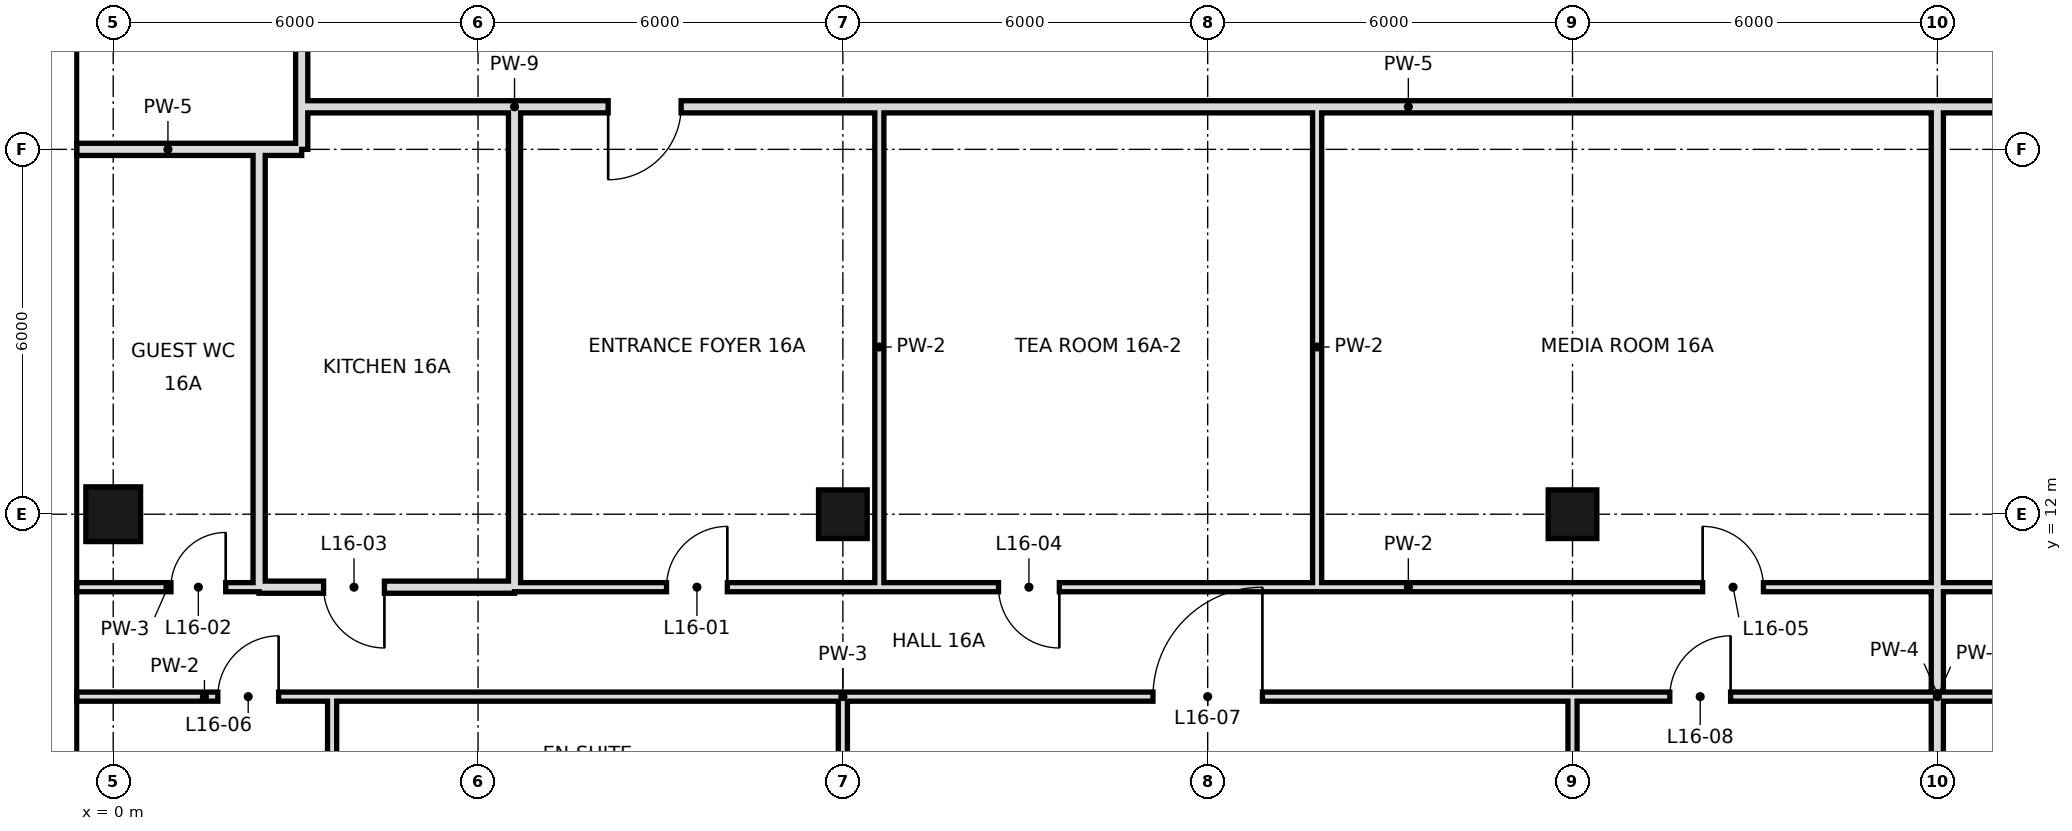
"""IFC4 building model, lengths in metres.
Left out: names, types, materials, properties, quantities, classifications, styles, units other than length and angle.
Written with IfcOpenShell. Run it as: python <this file> out.ifc"""

import sys

from ifc_helpers import new_model, si_unit, direction, frame, frame_2d, origin, origin_2d, place, context, subcontext, project, spatial, rectangle, hollow_rectangle, extrude, element, fill, save


model = new_model("IFC4")
c1 = context("Model", 3, precision=1e-05, world=origin(), true_north=direction((0.0, 1.0)))
c2 = subcontext(c1, "Body", "Model", "MODEL_VIEW")
j1 = project(units=[si_unit("LENGTHUNIT", "METRE"), si_unit("PLANEANGLEUNIT", "RADIAN")], contexts=[c1])
p1 = place(None, origin())
s1 = spatial("IfcSite", under=j1, at=p1, CompositionType="ELEMENT")
p2 = place(p1, origin())
s2 = spatial("IfcBuilding", under=s1, at=p2, CompositionType="ELEMENT")
p3 = place(p2, frame((0.0, 0.0, 78.6)))
s3 = spatial("IfcBuildingStorey", under=s2, at=p3, CompositionType="ELEMENT", Elevation=78.6)
p4 = place(p3, frame((0.0, 12.0, 0.0), z_axis=(0.0, 0.0, 1.0), x_axis=(1.0, 0.0, 0.0)))
e1 = element("IfcColumn", 1, at=p4, inside=s3, PredefinedType="COLUMN", context=c2, shape_type="SweptSolid", body=[
    extrude(hollow_rectangle(XDim=0.9, YDim=0.9, WallThickness=0.045, at=origin_2d()), origin(), (0.0, 0.0, 1.0), 3.6),
])
for number, where, z_axis, x_axis in (
    (2, (12.0, 12.0, 0.0), (0.0, 0.0, 1.0), (1.0, 0.0, 0.0)),
    (3, (24.0, 12.0, 0.0), (0.0, 0.0, 1.0), (1.0, 0.0, 0.0)),
):
    element("IfcColumn", number, at=place(p3, frame(where, z_axis=z_axis, x_axis=x_axis)), inside=s3, PredefinedType="COLUMN", context=c2, shape_type="SweptSolid", body=[
        extrude(hollow_rectangle(XDim=0.8, YDim=0.8, WallThickness=0.04, at=origin_2d()), origin(), (0.0, 0.0, 1.0), 3.6),
    ])
p5 = place(p3, frame((12.0, 6.0, 0.0), z_axis=(0.0, 0.0, 1.0), x_axis=(0.0, 1.0, 0.0)))
e4 = element("IfcWall", 4, at=p5, inside=s3, PredefinedType="PARTITIONING", context=c2, shape_type="SweptSolid", body=[
    extrude(rectangle(XDim=3.0, YDim=0.15, at=frame_2d((1.5, 0.0))), origin(), (0.0, 0.0, 1.0), 2.72),
])
for number, where, z_axis, x_axis in (
    (5, (12.6, 10.8, 0.0), (0.0, 0.0, 1.0), (0.0, 1.0, 0.0)),
    (6, (19.8, 10.8, 0.0), (0.0, 0.0, 1.0), (0.0, 1.0, 0.0)),
):
    element("IfcWall", number, at=place(p3, frame(where, z_axis=z_axis, x_axis=x_axis)), inside=s3, PredefinedType="PARTITIONING", context=c2, shape_type="SweptSolid", body=[
        extrude(rectangle(XDim=7.9, YDim=0.15, at=frame_2d((3.95, 0.0))), origin(), (0.0, 0.0, 1.0), 3.42),
    ])
p6 = place(p3, frame((2.4, 10.8, 0.0), z_axis=(0.0, 0.0, 1.0), x_axis=(0.0, 1.0, 0.0)))
e7 = element("IfcWall", 7, at=p6, inside=s3, PredefinedType="SOLIDWALL", context=c2, shape_type="SweptSolid", body=[
    extrude(rectangle(XDim=7.2, YDim=0.2, at=frame_2d((3.6, 0.0))), origin(), (0.0, 0.0, 1.0), 2.72),
])
p7 = place(p3, frame((24.0, 0.0, 0.0), z_axis=(0.0, 0.0, 1.0), x_axis=(0.0, 1.0, 0.0)))
e8 = element("IfcWall", 8, at=p7, inside=s3, PredefinedType="PARTITIONING", context=c2, shape_type="SweptSolid", body=[
    extrude(rectangle(XDim=9.0, YDim=0.15, at=frame_2d((4.5, 0.0))), origin(), (0.0, 0.0, 1.0), 2.72),
])
p8 = place(p3, frame((3.1, 18.7, 0.0), z_axis=(0.0, 0.0, 1.0), x_axis=(0.0, 1.0, 0.0)))
e9 = element("IfcWall", 9, at=p8, inside=s3, PredefinedType="SOLIDWALL", context=c2, shape_type="SweptSolid", body=[
    extrude(rectangle(XDim=27.249, YDim=0.2, at=frame_2d((13.625, 0.0))), origin(), (0.0, 0.0, 1.0), 2.97),
])
p9 = place(p8, frame((7.66, 0.0, 0.0)))
e10 = element("IfcOpeningElement", 10, at=p9, cuts=e9, PredefinedType="OPENING", context=c2, shape_type="SweptSolid", body=[
    extrude(rectangle(XDim=1.2, YDim=2.4, at=frame_2d((0.6, 1.2))), frame((0.0, 0.11, 0.0), z_axis=(0.0, -1.0, 0.0), x_axis=(1.0, 0.0, 0.0)), (0.0, 0.0, 1.0), 0.22),
])
p10 = place(p3, frame((3.1, 18.0, 0.0), z_axis=(0.0, 0.0, 1.0), x_axis=(0.0, 1.0, 0.0)))
e11 = element("IfcWall", 11, at=p10, inside=s3, PredefinedType="SOLIDWALL", context=c2, shape_type="SweptSolid", body=[
    extrude(rectangle(XDim=0.7, YDim=0.2, at=frame_2d((0.35, 0.0))), origin(), (0.0, 0.0, 1.0), 2.97),
])
p11 = place(p3, frame((3.6, 6.0, 0.0), z_axis=(0.0, 0.0, 1.0), x_axis=(0.0, 1.0, 0.0)))
e12 = element("IfcWall", 12, at=p11, inside=s3, PredefinedType="PARTITIONING", context=c2, shape_type="SweptSolid", body=[
    extrude(rectangle(XDim=3.0, YDim=0.15, at=frame_2d((1.5, 0.0))), origin(), (0.0, 0.0, 1.0), 3.42),
])
p12 = place(p3, frame((30.0, -0.6, 0.0), z_axis=(0.0, 0.0, 1.0), x_axis=(0.0, 1.0, 0.0)))
e13 = element("IfcWall", 13, at=p12, inside=s3, PredefinedType="SOLIDWALL", context=c2, shape_type="SweptSolid", body=[
    extrude(rectangle(XDim=19.3, YDim=0.2, at=frame_2d((9.65, 0.0))), origin(), (0.0, 0.0, 1.0), 2.72),
])
p13 = place(p3, frame((6.6, 10.8, 0.0), z_axis=(0.0, 0.0, 1.0), x_axis=(0.0, 1.0, 0.0)))
e14 = element("IfcWall", 14, at=p13, inside=s3, PredefinedType="SOLIDWALL", context=c2, shape_type="SweptSolid", body=[
    extrude(rectangle(XDim=7.9, YDim=0.2, at=frame_2d((3.95, 0.0))), origin(), (0.0, 0.0, 1.0), 2.72),
])
p14 = place(p3, frame((2.4, 10.8, 0.0), z_axis=(0.0, 0.0, 1.0), x_axis=(1.0, 0.0, 0.0)))
e15 = element("IfcWall", 15, at=p14, inside=s3, PredefinedType="SOLIDWALL", context=c2, shape_type="SweptSolid", body=[
    extrude(rectangle(XDim=4.2, YDim=0.2, at=frame_2d((2.1, 0.0))), origin(), (0.0, 0.0, 1.0), 2.72),
])
p15 = place(p14, frame((1.06, 0.0, 0.0)))
e16 = element("IfcOpeningElement", 16, at=p15, cuts=e15, PredefinedType="OPENING", context=c2, shape_type="SweptSolid", body=[
    extrude(rectangle(XDim=1.0, YDim=2.4, at=frame_2d((0.5, 1.2))), frame((0.0, 0.11, 0.0), z_axis=(0.0, -1.0, 0.0), x_axis=(1.0, 0.0, 0.0)), (0.0, 0.0, 1.0), 0.22),
])
p16 = place(p3, frame((6.6, 10.8, 0.0), z_axis=(0.0, 0.0, 1.0), x_axis=(1.0, 0.0, 0.0)))
e17 = element("IfcWall", 17, at=p16, inside=s3, PredefinedType="PARTITIONING", context=c2, shape_type="SweptSolid", body=[
    extrude(rectangle(XDim=29.4, YDim=0.15, at=frame_2d((14.7, 0.0))), origin(), (0.0, 0.0, 1.0), 3.42),
])
p17 = place(p16, frame((2.5, 0.0, 0.0)))
e18 = element("IfcOpeningElement", 18, at=p17, cuts=e17, PredefinedType="OPENING", context=c2, shape_type="SweptSolid", body=[
    extrude(rectangle(XDim=1.0, YDim=2.4, at=frame_2d((0.5, 1.2))), frame((0.0, 0.085, 0.0), z_axis=(0.0, -1.0, 0.0), x_axis=(1.0, 0.0, 0.0)), (0.0, 0.0, 1.0), 0.17),
])
p18 = place(p16, frame((7.96, 0.0, 0.0)))
e19 = element("IfcOpeningElement", 19, at=p18, cuts=e17, PredefinedType="OPENING", context=c2, shape_type="SweptSolid", body=[
    extrude(rectangle(XDim=1.0, YDim=2.4, at=frame_2d((0.5, 1.2))), frame((0.0, 0.085, 0.0), z_axis=(0.0, -1.0, 0.0), x_axis=(1.0, 0.0, 0.0)), (0.0, 0.0, 1.0), 0.17),
])
p19 = place(p16, frame((19.54, 0.0, 0.0)))
e20 = element("IfcOpeningElement", 20, at=p19, cuts=e17, PredefinedType="OPENING", context=c2, shape_type="SweptSolid", body=[
    extrude(rectangle(XDim=1.0, YDim=2.4, at=frame_2d((0.5, 1.2))), frame((0.0, 0.085, 0.0), z_axis=(0.0, -1.0, 0.0), x_axis=(1.0, 0.0, 0.0)), (0.0, 0.0, 1.0), 0.17),
])
p20 = place(p16, frame((26.8, 0.0, 0.0)))
e21 = element("IfcOpeningElement", 21, at=p20, cuts=e17, PredefinedType="OPENING", context=c2, shape_type="SweptSolid", body=[
    extrude(rectangle(XDim=1.0, YDim=2.4, at=frame_2d((0.5, 1.2))), frame((0.0, 0.085, 0.0), z_axis=(0.0, -1.0, 0.0), x_axis=(1.0, 0.0, 0.0)), (0.0, 0.0, 1.0), 0.17),
])
p21 = place(p3, frame((-0.6, 10.8, 0.0), z_axis=(0.0, 0.0, 1.0), x_axis=(1.0, 0.0, 0.0)))
e22 = element("IfcWall", 22, at=p21, inside=s3, PredefinedType="PARTITIONING", context=c2, shape_type="SweptSolid", body=[
    extrude(rectangle(XDim=3.0, YDim=0.15, at=frame_2d((1.5, 0.0))), origin(), (0.0, 0.0, 1.0), 3.42),
])
p22 = place(p21, frame((1.55, 0.0, 0.0)))
e23 = element("IfcOpeningElement", 23, at=p22, cuts=e22, PredefinedType="OPENING", context=c2, shape_type="SweptSolid", body=[
    extrude(rectangle(XDim=0.9, YDim=2.4, at=frame_2d((0.45, 1.2))), frame((0.0, 0.085, 0.0), z_axis=(0.0, -1.0, 0.0), x_axis=(1.0, 0.0, 0.0)), (0.0, 0.0, 1.0), 0.17),
])
p23 = place(p3, frame((-0.6, 18.0, 0.0), z_axis=(0.0, 0.0, 1.0), x_axis=(1.0, 0.0, 0.0)))
e24 = element("IfcWall", 24, at=p23, inside=s3, PredefinedType="SOLIDWALL", context=c2, shape_type="SweptSolid", body=[
    extrude(rectangle(XDim=3.0, YDim=0.2, at=frame_2d((1.5, 0.0))), origin(), (0.0, 0.0, 1.0), 2.72),
])
p24 = place(p3, frame((2.4, 18.0, 0.0), z_axis=(0.0, 0.0, 1.0), x_axis=(1.0, 0.0, 0.0)))
e25 = element("IfcWall", 25, at=p24, inside=s3, PredefinedType="SOLIDWALL", context=c2, shape_type="SweptSolid", body=[
    extrude(rectangle(XDim=0.7, YDim=0.2, at=frame_2d((0.35, 0.0))), origin(), (0.0, 0.0, 1.0), 2.97),
])
p25 = place(p3, frame((6.6, 18.7, 0.0), z_axis=(0.0, 0.0, 1.0), x_axis=(1.0, 0.0, 0.0)))
e26 = element("IfcWall", 26, at=p25, inside=s3, PredefinedType="SOLIDWALL", context=c2, shape_type="SweptSolid", body=[
    extrude(rectangle(XDim=29.4, YDim=0.2, at=frame_2d((14.7, 0.0))), origin(), (0.0, 0.0, 1.0), 2.72),
])
p26 = place(p25, frame((1.54, 0.0, 0.0)))
e27 = element("IfcOpeningElement", 27, at=p26, cuts=e26, PredefinedType="OPENING", context=c2, shape_type="SweptSolid", body=[
    extrude(rectangle(XDim=1.2, YDim=2.4, at=frame_2d((0.6, 1.2))), frame((0.0, 0.11, 0.0), z_axis=(0.0, -1.0, 0.0), x_axis=(1.0, 0.0, 0.0)), (0.0, 0.0, 1.0), 0.22),
])
p27 = place(p25, frame((24.94, 0.0, 0.0)))
e28 = element("IfcOpeningElement", 28, at=p27, cuts=e26, PredefinedType="OPENING", context=c2, shape_type="SweptSolid", body=[
    extrude(rectangle(XDim=1.2, YDim=2.4, at=frame_2d((0.6, 1.2))), frame((0.0, 0.11, 0.0), z_axis=(0.0, -1.0, 0.0), x_axis=(1.0, 0.0, 0.0)), (0.0, 0.0, 1.0), 0.22),
])
p28 = place(p3, frame((3.1, 18.7, 0.0), z_axis=(0.0, 0.0, 1.0), x_axis=(1.0, 0.0, 0.0)))
e29 = element("IfcWall", 29, at=p28, inside=s3, PredefinedType="SOLIDWALL", context=c2, shape_type="SweptSolid", body=[
    extrude(rectangle(XDim=3.5, YDim=0.2, at=frame_2d((1.75, 0.0))), origin(), (0.0, 0.0, 1.0), 2.72),
])
p29 = place(p3, frame((-0.6, 9.0, 0.0), z_axis=(0.0, 0.0, 1.0), x_axis=(1.0, 0.0, 0.0)))
e30 = element("IfcWall", 30, at=p29, inside=s3, PredefinedType="PARTITIONING", context=c2, shape_type="SweptSolid", body=[
    extrude(rectangle(XDim=4.2, YDim=0.15, at=frame_2d((2.1, 0.0))), origin(), (0.0, 0.0, 1.0), 3.42),
])
p30 = place(p29, frame((2.32, 0.0, 0.0)))
e31 = element("IfcOpeningElement", 31, at=p30, cuts=e30, PredefinedType="OPENING", context=c2, shape_type="SweptSolid", body=[
    extrude(rectangle(XDim=1.0, YDim=2.4, at=frame_2d((0.5, 1.2))), frame((0.0, 0.085, 0.0), z_axis=(0.0, -1.0, 0.0), x_axis=(1.0, 0.0, 0.0)), (0.0, 0.0, 1.0), 0.17),
])
p31 = place(p3, frame((12.0, 9.0, 0.0), z_axis=(0.0, 0.0, 1.0), x_axis=(1.0, 0.0, 0.0)))
e32 = element("IfcWall", 32, at=p31, inside=s3, PredefinedType="PARTITIONING", context=c2, shape_type="SweptSolid", body=[
    extrude(rectangle(XDim=36.0, YDim=0.15, at=frame_2d((18.0, 0.0))), origin(), (0.0, 0.0, 1.0), 3.42),
])
p32 = place(p31, frame((5.1, 0.0, 0.0)))
e33 = element("IfcOpeningElement", 33, at=p32, cuts=e32, PredefinedType="OPENING", context=c2, shape_type="SweptSolid", body=[
    extrude(rectangle(XDim=1.8, YDim=2.4, at=frame_2d((0.9, 1.2))), frame((0.0, 0.085, 0.0), z_axis=(0.0, -1.0, 0.0), x_axis=(1.0, 0.0, 0.0)), (0.0, 0.0, 1.0), 0.17),
])
p33 = place(p31, frame((13.6, 0.0, 0.0)))
e34 = element("IfcOpeningElement", 34, at=p33, cuts=e32, PredefinedType="OPENING", context=c2, shape_type="SweptSolid", body=[
    extrude(rectangle(XDim=1.0, YDim=2.4, at=frame_2d((0.5, 1.2))), frame((0.0, 0.085, 0.0), z_axis=(0.0, -1.0, 0.0), x_axis=(1.0, 0.0, 0.0)), (0.0, 0.0, 1.0), 0.17),
])
p34 = place(p31, frame((21.4, 0.0, 0.0)))
e35 = element("IfcOpeningElement", 35, at=p34, cuts=e32, PredefinedType="OPENING", context=c2, shape_type="SweptSolid", body=[
    extrude(rectangle(XDim=1.0, YDim=2.4, at=frame_2d((0.5, 1.2))), frame((0.0, 0.085, 0.0), z_axis=(0.0, -1.0, 0.0), x_axis=(1.0, 0.0, 0.0)), (0.0, 0.0, 1.0), 0.17),
])
p35 = place(p31, frame((25.6, 0.0, 0.0)))
e36 = element("IfcOpeningElement", 36, at=p35, cuts=e32, PredefinedType="OPENING", context=c2, shape_type="SweptSolid", body=[
    extrude(rectangle(XDim=1.0, YDim=2.4, at=frame_2d((0.5, 1.2))), frame((0.0, 0.085, 0.0), z_axis=(0.0, -1.0, 0.0), x_axis=(1.0, 0.0, 0.0)), (0.0, 0.0, 1.0), 0.17),
])
p36 = place(p31, frame((33.4, 0.0, 0.0)))
e37 = element("IfcOpeningElement", 37, at=p36, cuts=e32, PredefinedType="OPENING", context=c2, shape_type="SweptSolid", body=[
    extrude(rectangle(XDim=1.0, YDim=2.4, at=frame_2d((0.5, 1.2))), frame((0.0, 0.085, 0.0), z_axis=(0.0, -1.0, 0.0), x_axis=(1.0, 0.0, 0.0)), (0.0, 0.0, 1.0), 0.17),
])
p37 = place(p3, frame((3.6, 9.0, 0.0), z_axis=(0.0, 0.0, 1.0), x_axis=(1.0, 0.0, 0.0)))
e38 = element("IfcWall", 38, at=p37, inside=s3, PredefinedType="PARTITIONING", context=c2, shape_type="SweptSolid", body=[
    extrude(rectangle(XDim=8.4, YDim=0.15, at=frame_2d((4.2, 0.0))), origin(), (0.0, 0.0, 1.0), 3.42),
])
p38 = place(p17, frame((1.0, 0.0, 0.0), z_axis=(0.0, 0.0, 1.0), x_axis=(-1.0, 0.0, 0.0)))
e39 = element("IfcDoor", 39, at=p38, inside=s3, OperationType="SINGLE_SWING_LEFT", PredefinedType="DOOR", context=c2, shape_type="SweptSolid", body=[
    extrude(rectangle(XDim=1.0, YDim=2.4, at=frame_2d((0.5, 1.2))), frame((0.0, 0.025, 0.0), z_axis=(0.0, -1.0, 0.0), x_axis=(1.0, 0.0, 0.0)), (0.0, 0.0, 1.0), 0.05),
])
fill(e18, e39)
p39 = place(p22, frame((0.9, 0.0, 0.0), z_axis=(0.0, 0.0, 1.0), x_axis=(-1.0, 0.0, 0.0)))
e40 = element("IfcDoor", 40, at=p39, inside=s3, OperationType="SINGLE_SWING_LEFT", PredefinedType="DOOR", context=c2, shape_type="SweptSolid", body=[
    extrude(rectangle(XDim=0.9, YDim=2.4, at=frame_2d((0.45, 1.2))), frame((0.0, 0.025, 0.0), z_axis=(0.0, -1.0, 0.0), x_axis=(1.0, 0.0, 0.0)), (0.0, 0.0, 1.0), 0.05),
])
fill(e23, e40)
p40 = place(p15, origin())
e41 = element("IfcDoor", 41, at=p40, inside=s3, OperationType="SINGLE_SWING_RIGHT", PredefinedType="DOOR", context=c2, shape_type="SweptSolid", body=[
    extrude(rectangle(XDim=1.0, YDim=2.4, at=frame_2d((0.5, 1.2))), frame((0.0, 0.025, 0.0), z_axis=(0.0, -1.0, 0.0), x_axis=(1.0, 0.0, 0.0)), (0.0, 0.0, 1.0), 0.05),
])
fill(e16, e41)
p41 = place(p18, origin())
e42 = element("IfcDoor", 42, at=p41, inside=s3, OperationType="SINGLE_SWING_RIGHT", PredefinedType="DOOR", context=c2, shape_type="SweptSolid", body=[
    extrude(rectangle(XDim=1.0, YDim=2.4, at=frame_2d((0.5, 1.2))), frame((0.0, 0.025, 0.0), z_axis=(0.0, -1.0, 0.0), x_axis=(1.0, 0.0, 0.0)), (0.0, 0.0, 1.0), 0.05),
])
fill(e19, e42)
p42 = place(p19, origin())
e43 = element("IfcDoor", 43, at=p42, inside=s3, OperationType="SINGLE_SWING_LEFT", PredefinedType="DOOR", context=c2, shape_type="SweptSolid", body=[
    extrude(rectangle(XDim=1.0, YDim=2.4, at=frame_2d((0.5, 1.2))), frame((0.0, 0.025, 0.0), z_axis=(0.0, -1.0, 0.0), x_axis=(1.0, 0.0, 0.0)), (0.0, 0.0, 1.0), 0.05),
])
fill(e20, e43)
p43 = place(p30, frame((1.0, 0.0, 0.0), z_axis=(0.0, 0.0, 1.0), x_axis=(-1.0, 0.0, 0.0)))
e44 = element("IfcDoor", 44, at=p43, inside=s3, OperationType="SINGLE_SWING_LEFT", PredefinedType="DOOR", context=c2, shape_type="SweptSolid", body=[
    extrude(rectangle(XDim=1.0, YDim=2.4, at=frame_2d((0.5, 1.2))), frame((0.0, 0.025, 0.0), z_axis=(0.0, -1.0, 0.0), x_axis=(1.0, 0.0, 0.0)), (0.0, 0.0, 1.0), 0.05),
])
fill(e31, e44)
p44 = place(p32, frame((1.8, 0.0, 0.0), z_axis=(0.0, 0.0, 1.0), x_axis=(-1.0, 0.0, 0.0)))
e45 = element("IfcDoor", 45, at=p44, inside=s3, OperationType="SINGLE_SWING_LEFT", PredefinedType="DOOR", context=c2, shape_type="SweptSolid", body=[
    extrude(rectangle(XDim=1.8, YDim=2.4, at=frame_2d((0.9, 1.2))), frame((0.0, 0.025, 0.0), z_axis=(0.0, -1.0, 0.0), x_axis=(1.0, 0.0, 0.0)), (0.0, 0.0, 1.0), 0.05),
])
fill(e33, e45)
p45 = place(p33, frame((1.0, 0.0, 0.0), z_axis=(0.0, 0.0, 1.0), x_axis=(-1.0, 0.0, 0.0)))
e46 = element("IfcDoor", 46, at=p45, inside=s3, OperationType="SINGLE_SWING_LEFT", PredefinedType="DOOR", context=c2, shape_type="SweptSolid", body=[
    extrude(rectangle(XDim=1.0, YDim=2.4, at=frame_2d((0.5, 1.2))), frame((0.0, 0.025, 0.0), z_axis=(0.0, -1.0, 0.0), x_axis=(1.0, 0.0, 0.0)), (0.0, 0.0, 1.0), 0.05),
])
fill(e34, e46)
p46 = place(p26, frame((1.2, 0.0, 0.0), z_axis=(0.0, 0.0, 1.0), x_axis=(-1.0, 0.0, 0.0)))
e47 = element("IfcDoor", 47, at=p46, inside=s3, OperationType="SINGLE_SWING_RIGHT", PredefinedType="DOOR", context=c2, shape_type="SweptSolid", body=[
    extrude(rectangle(XDim=1.2, YDim=2.4, at=frame_2d((0.6, 1.2))), frame((0.0, 0.025, 0.0), z_axis=(0.0, -1.0, 0.0), x_axis=(1.0, 0.0, 0.0)), (0.0, 0.0, 1.0), 0.05),
])
fill(e27, e47)
save(model, sys.argv[1])
